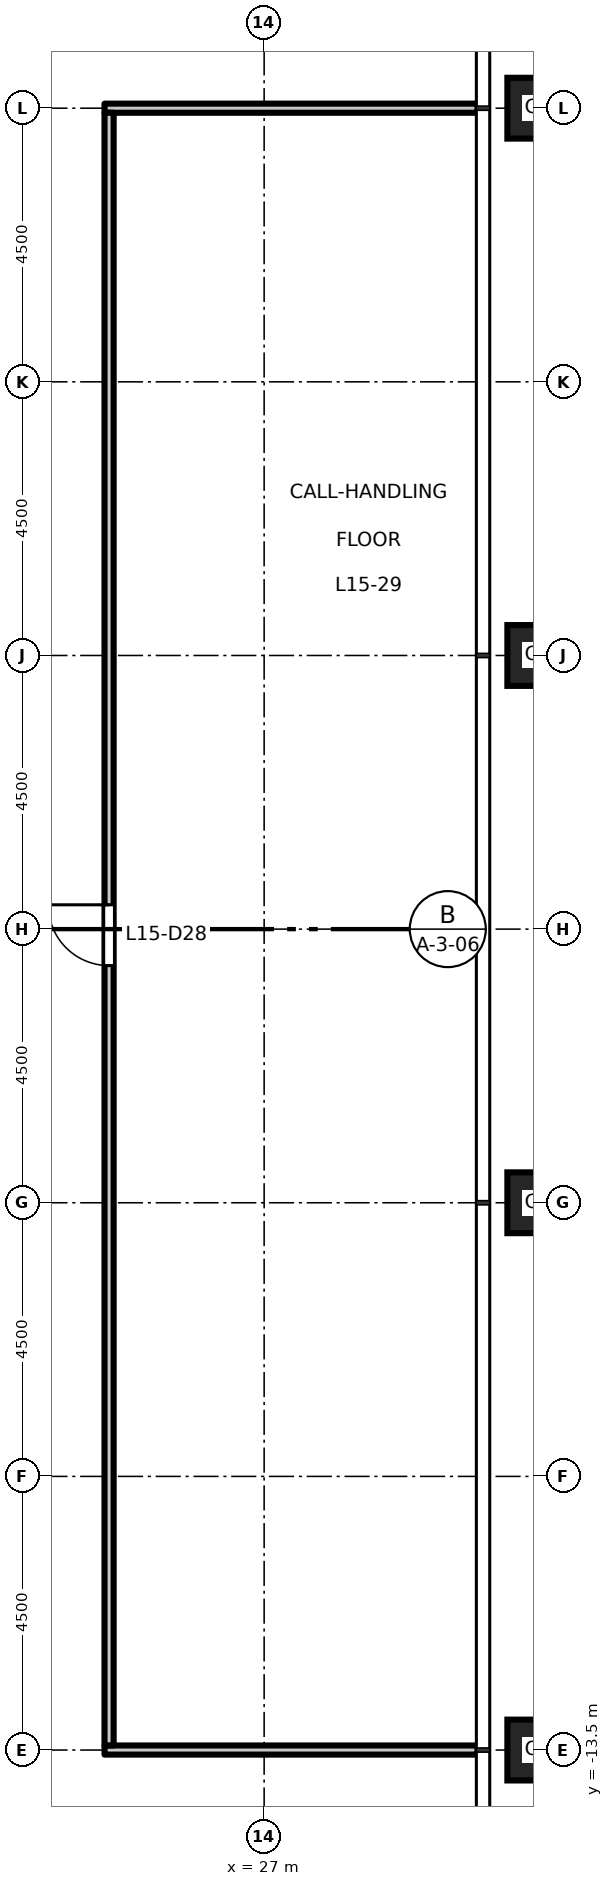
"""IFC4 building model, lengths in metres.
Left out: names, types, materials, properties, quantities, classifications, styles, units other than length and angle.
Written with IfcOpenShell. Run it as: python <this file> out.ifc"""

import sys

from ifc_helpers import new_model, si_unit, direction, frame, frame_2d, origin, origin_2d, place, context, subcontext, project, spatial, rectangle, hollow_rectangle, extrude, element, fill, save


model = new_model("IFC4")
c1 = context("Model", 3, precision=1e-05, world=origin(), true_north=direction((0.0, 1.0)))
c2 = subcontext(c1, "Body", "Model", "MODEL_VIEW")
j1 = project(units=[si_unit("LENGTHUNIT", "METRE"), si_unit("PLANEANGLEUNIT", "RADIAN")], contexts=[c1])
p1 = place(None, origin())
s1 = spatial("IfcSite", under=j1, at=p1, CompositionType="ELEMENT")
p2 = place(p1, origin())
s2 = spatial("IfcBuilding", under=s1, at=p2, CompositionType="ELEMENT")
p3 = place(p2, frame((0.0, 0.0, 71.7)))
s3 = spatial("IfcBuildingStorey", under=s2, at=p3, CompositionType="ELEMENT", Elevation=71.7)
for number, where, z_axis, x_axis in (
    (1, (31.5, -13.5, 0.0), (0.0, 0.0, 1.0), (1.0, 0.0, 0.0)),
    (2, (31.5, -4.5, 0.0), (0.0, 0.0, 1.0), (1.0, 0.0, 0.0)),
    (3, (31.5, 4.5, 0.0), (0.0, 0.0, 1.0), (1.0, 0.0, 0.0)),
    (4, (31.5, 13.5, 0.0), (0.0, 0.0, 1.0), (1.0, 0.0, 0.0)),
):
    element("IfcColumn", number, at=place(p3, frame(where, z_axis=z_axis, x_axis=x_axis)), inside=s3, PredefinedType="COLUMN", context=c2, shape_type="SweptSolid", body=[
        extrude(hollow_rectangle(XDim=1.0, YDim=1.0, WallThickness=0.06, at=origin_2d()), origin(), (0.0, 0.0, 1.0), 4.5),
    ])
for number, where, z_axis, x_axis in (
    (5, (24.375, -13.5, 0.0), (0.0, 0.0, 1.0), (1.0, 0.0, 0.0)),
    (6, (24.375, 13.5, 0.0), (0.0, 0.0, 1.0), (1.0, 0.0, 0.0)),
):
    element("IfcWall", number, at=place(p3, frame(where, z_axis=z_axis, x_axis=x_axis)), inside=s3, PredefinedType="PARTITIONING", context=c2, shape_type="SweptSolid", body=[
        extrude(rectangle(XDim=6.135, YDim=0.15, at=frame_2d((3.067, 0.0))), origin(), (0.0, 0.0, 1.0), 3.35),
    ])
p4 = place(p3, frame((24.45, -13.425, 0.0), z_axis=(0.0, 0.0, 1.0), x_axis=(0.0, 1.0, 0.0)))
e7 = element("IfcWall", 7, at=p4, inside=s3, PredefinedType="PARTITIONING", context=c2, shape_type="SweptSolid", body=[
    extrude(rectangle(XDim=26.85, YDim=0.15, at=frame_2d((13.425, 0.0))), origin(), (0.0, 0.0, 1.0), 4.35),
])
p5 = place(p4, frame((12.825, 0.0, 0.0)))
e8 = element("IfcOpeningElement", 8, at=p5, cuts=e7, PredefinedType="OPENING", context=c2, shape_type="SweptSolid", body=[
    extrude(rectangle(XDim=1.0, YDim=2.1, at=frame_2d((0.5, 1.05))), frame((0.0, 0.085, 0.0), z_axis=(0.0, -1.0, 0.0), x_axis=(1.0, 0.0, 0.0)), (0.0, 0.0, 1.0), 0.17),
])
p6 = place(p5, origin())
e9 = element("IfcDoor", 9, at=p6, inside=s3, OperationType="SINGLE_SWING_RIGHT", PredefinedType="DOOR", context=c2, shape_type="SweptSolid", body=[
    extrude(rectangle(XDim=1.0, YDim=2.1, at=frame_2d((0.5, 1.05))), frame((0.0, 0.025, 0.0), z_axis=(0.0, -1.0, 0.0), x_axis=(1.0, 0.0, 0.0)), (0.0, 0.0, 1.0), 0.05),
])
fill(e8, e9)
save(model, sys.argv[1])
